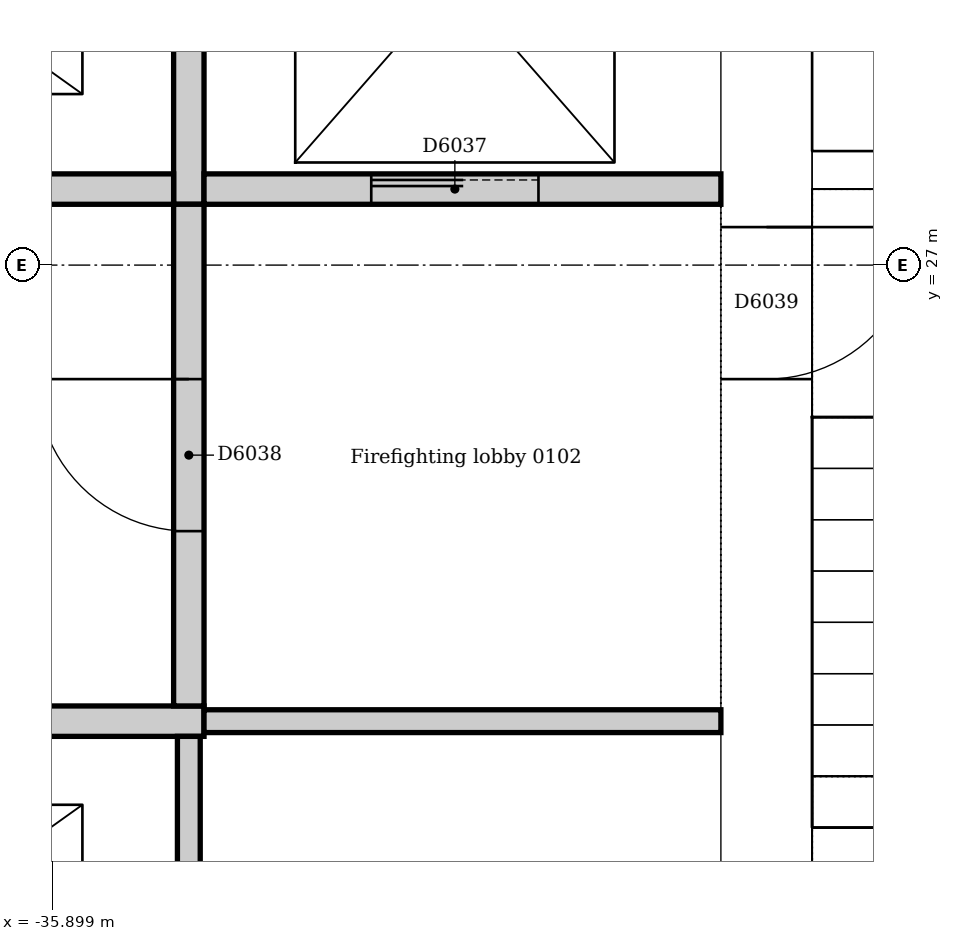
"""IFC4 building model, lengths in metres.
Left out: names, types, materials, properties, quantities, classifications, styles, units other than length and angle.
Written with IfcOpenShell. Run it as: python <this file> out.ifc"""

import sys

from ifc_helpers import new_model, si_unit, direction, frame, frame_2d, origin, place, context, subcontext, project, spatial, rectangle, extrude, element, fill, save


model = new_model("IFC4")
c1 = context("Model", 3, precision=1e-05, world=origin(), true_north=direction((0.0, 1.0)))
c2 = subcontext(c1, "Body", "Model", "MODEL_VIEW")
j1 = project(units=[si_unit("LENGTHUNIT", "METRE"), si_unit("PLANEANGLEUNIT", "RADIAN")], contexts=[c1])
p1 = place(None, origin())
s1 = spatial("IfcSite", under=j1, at=p1, CompositionType="ELEMENT")
p2 = place(p1, origin())
s2 = spatial("IfcBuilding", under=s1, at=p2, CompositionType="ELEMENT")
p3 = place(p2, frame((0.0, 0.0, 6.0)))
s3 = spatial("IfcBuildingStorey", under=s2, at=p3, CompositionType="ELEMENT", Elevation=6.0)
p4 = place(p3, frame((-31.2, 21.0, 0.0), z_axis=(0.0, 0.0, 1.0), x_axis=(0.0, 1.0, 0.0)))
e1 = element("IfcWall", 1, at=p4, inside=s3, PredefinedType="SOLIDWALL", context=c2, shape_type="SweptSolid", body=[
    extrude(rectangle(XDim=9.5, YDim=0.6, at=frame_2d((4.75, 0.0))), origin(), (0.0, 0.0, 1.0), 5.0),
])
p5 = place(p4, frame((5.25, 0.0, 0.0)))
e2 = element("IfcOpeningElement", 2, at=p5, cuts=e1, PredefinedType="OPENING", context=c2, shape_type="SweptSolid", body=[
    extrude(rectangle(XDim=1.0, YDim=2.1, at=frame_2d((0.5, 1.05))), frame((0.0, 0.31, 0.0), z_axis=(0.0, -1.0, 0.0), x_axis=(1.0, 0.0, 0.0)), (0.0, 0.0, 1.0), 0.62),
])
p6 = place(p3, frame((-27.36, 27.625, 0.0), z_axis=(0.0, 0.0, 1.0), x_axis=(-1.0, 0.0, 0.0)))
e3 = element("IfcWall", 3, at=p6, inside=s3, PredefinedType="SOLIDWALL", context=c2, shape_type="SweptSolid", body=[
    extrude(rectangle(XDim=3.54, YDim=0.25, at=frame_2d((1.77, 0.0))), origin(), (0.0, 0.0, 1.0), 5.0),
])
p7 = place(p6, frame((1.69, 0.0, 0.0)))
e4 = element("IfcOpeningElement", 4, at=p7, cuts=e3, PredefinedType="OPENING", context=c2, shape_type="SweptSolid", body=[
    extrude(rectangle(XDim=1.1, YDim=2.1, at=frame_2d((0.55, 1.05))), frame((0.0, 0.135, 0.0), z_axis=(0.0, -1.0, 0.0), x_axis=(1.0, 0.0, 0.0)), (0.0, 0.0, 1.0), 0.27),
])
p8 = place(p3, frame((-34.9, 24.0, 0.0), z_axis=(0.0, 0.0, 1.0), x_axis=(-1.0, 0.0, 0.0)))
e5 = element("IfcWall", 5, at=p8, inside=s3, PredefinedType="SOLIDWALL", context=c2, shape_type="SweptSolid", body=[
    extrude(rectangle(XDim=3.5, YDim=0.2, at=frame_2d((1.75, 0.0))), origin(), (0.0, 0.0, 1.0), 5.0),
])
p9 = place(p8, frame((1.3, 0.0, 0.0)))
e6 = element("IfcOpeningElement", 6, at=p9, cuts=e5, PredefinedType="OPENING", context=c2, shape_type="SweptSolid", body=[
    extrude(rectangle(XDim=1.1, YDim=2.1, at=frame_2d((0.55, 1.05))), frame((0.0, 0.11, 0.0), z_axis=(0.0, -1.0, 0.0), x_axis=(1.0, 0.0, 0.0)), (0.0, 0.0, 1.0), 0.22),
])
p10 = place(p3, frame((-35.0, 27.4, 0.0), z_axis=(0.0, 0.0, 1.0), x_axis=(0.0, 1.0, 0.0)))
e7 = element("IfcWall", 7, at=p10, inside=s3, PredefinedType="SOLIDWALL", context=c2, shape_type="SweptSolid", body=[
    extrude(rectangle(XDim=2.85, YDim=0.2, at=frame_2d((1.425, 0.0))), origin(), (0.0, 0.0, 1.0), 5.0),
])
p11 = place(p3, frame((-38.4, 27.5, 0.0), z_axis=(0.0, 0.0, 1.0), x_axis=(1.0, 0.0, 0.0)))
e8 = element("IfcWall", 8, at=p11, inside=s3, PredefinedType="SOLIDWALL", context=c2, shape_type="SweptSolid", body=[
    extrude(rectangle(XDim=3.3, YDim=0.2, at=frame_2d((1.65, 0.0))), origin(), (0.0, 0.0, 1.0), 5.0),
])
p12 = place(p11, frame((1.1, 0.0, 0.0)))
e9 = element("IfcOpeningElement", 9, at=p12, cuts=e8, PredefinedType="OPENING", context=c2, shape_type="SweptSolid", body=[
    extrude(rectangle(XDim=1.1, YDim=2.1, at=frame_2d((0.55, 1.05))), frame((0.0, 0.11, 0.0), z_axis=(0.0, -1.0, 0.0), x_axis=(1.0, 0.0, 0.0)), (0.0, 0.0, 1.0), 0.22),
])
p13 = place(p3, frame((-34.9, 27.5, 0.0), z_axis=(0.0, 0.0, 1.0), x_axis=(1.0, 0.0, 0.0)))
e10 = element("IfcWall", 10, at=p13, inside=s3, PredefinedType="SOLIDWALL", context=c2, shape_type="SweptSolid", body=[
    extrude(rectangle(XDim=3.4, YDim=0.2, at=frame_2d((1.7, 0.0))), origin(), (0.0, 0.0, 1.0), 5.0),
])
p14 = place(p13, frame((1.1, 0.0, 0.0)))
e11 = element("IfcOpeningElement", 11, at=p14, cuts=e10, PredefinedType="OPENING", context=c2, shape_type="SweptSolid", body=[
    extrude(rectangle(XDim=1.1, YDim=2.1, at=frame_2d((0.55, 1.05))), frame((0.0, 0.11, 0.0), z_axis=(0.0, -1.0, 0.0), x_axis=(1.0, 0.0, 0.0)), (0.0, 0.0, 1.0), 0.22),
])
p15 = place(p3, frame((-35.0, 24.1, 0.0), z_axis=(0.0, 0.0, 1.0), x_axis=(0.0, 1.0, 0.0)))
e12 = element("IfcWall", 12, at=p15, inside=s3, PredefinedType="SOLIDWALL", context=c2, shape_type="SweptSolid", body=[
    extrude(rectangle(XDim=3.3, YDim=0.2, at=frame_2d((1.65, 0.0))), origin(), (0.0, 0.0, 1.0), 5.0),
])
p16 = place(p15, frame((1.15, 0.0, 0.0)))
e13 = element("IfcOpeningElement", 13, at=p16, cuts=e12, PredefinedType="OPENING", context=c2, shape_type="SweptSolid", body=[
    extrude(rectangle(XDim=1.0, YDim=2.1, at=frame_2d((0.5, 1.05))), frame((0.0, 0.11, 0.0), z_axis=(0.0, -1.0, 0.0), x_axis=(1.0, 0.0, 0.0)), (0.0, 0.0, 1.0), 0.22),
])
p17 = place(p3, frame((-35.0, 21.0, 0.0), z_axis=(0.0, 0.0, 1.0), x_axis=(0.0, 1.0, 0.0)))
e14 = element("IfcWall", 14, at=p17, inside=s3, PredefinedType="SOLIDWALL", context=c2, shape_type="SweptSolid", body=[
    extrude(rectangle(XDim=2.9, YDim=0.15, at=frame_2d((1.45, 0.0))), origin(), (0.0, 0.0, 1.0), 5.0),
])
p18 = place(p3, frame((-31.5, 24.0, 0.0), z_axis=(0.0, 0.0, 1.0), x_axis=(-1.0, 0.0, 0.0)))
e15 = element("IfcWall", 15, at=p18, inside=s3, PredefinedType="SOLIDWALL", context=c2, shape_type="SweptSolid", body=[
    extrude(rectangle(XDim=3.4, YDim=0.15, at=frame_2d((1.7, 0.0))), origin(), (0.0, 0.0, 1.0), 5.0),
])
p19 = place(p14, origin())
e16 = element("IfcDoor", 16, at=p19, inside=s3, OperationType="SLIDING_TO_LEFT", PredefinedType="DOOR", context=c2, shape_type="SweptSolid", body=[
    extrude(rectangle(XDim=1.1, YDim=2.1, at=frame_2d((0.55, 1.05))), frame((0.0, 0.025, 0.0), z_axis=(0.0, -1.0, 0.0), x_axis=(1.0, 0.0, 0.0)), (0.0, 0.0, 1.0), 0.05),
])
fill(e11, e16)
p20 = place(p16, origin())
e17 = element("IfcDoor", 17, at=p20, inside=s3, OperationType="SINGLE_SWING_RIGHT", PredefinedType="DOOR", context=c2, shape_type="SweptSolid", body=[
    extrude(rectangle(XDim=1.0, YDim=2.1, at=frame_2d((0.5, 1.05))), frame((0.0, 0.025, 0.0), z_axis=(0.0, -1.0, 0.0), x_axis=(1.0, 0.0, 0.0)), (0.0, 0.0, 1.0), 0.05),
])
fill(e13, e17)
p21 = place(p5, frame((1.0, 0.0, 0.0), z_axis=(0.0, 0.0, 1.0), x_axis=(-1.0, 0.0, 0.0)))
e18 = element("IfcDoor", 18, at=p21, inside=s3, OperationType="SINGLE_SWING_LEFT", PredefinedType="DOOR", context=c2, shape_type="SweptSolid", body=[
    extrude(rectangle(XDim=1.0, YDim=2.1, at=frame_2d((0.5, 1.05))), frame((0.0, 0.025, 0.0), z_axis=(0.0, -1.0, 0.0), x_axis=(1.0, 0.0, 0.0)), (0.0, 0.0, 1.0), 0.05),
])
fill(e2, e18)
save(model, sys.argv[1])
